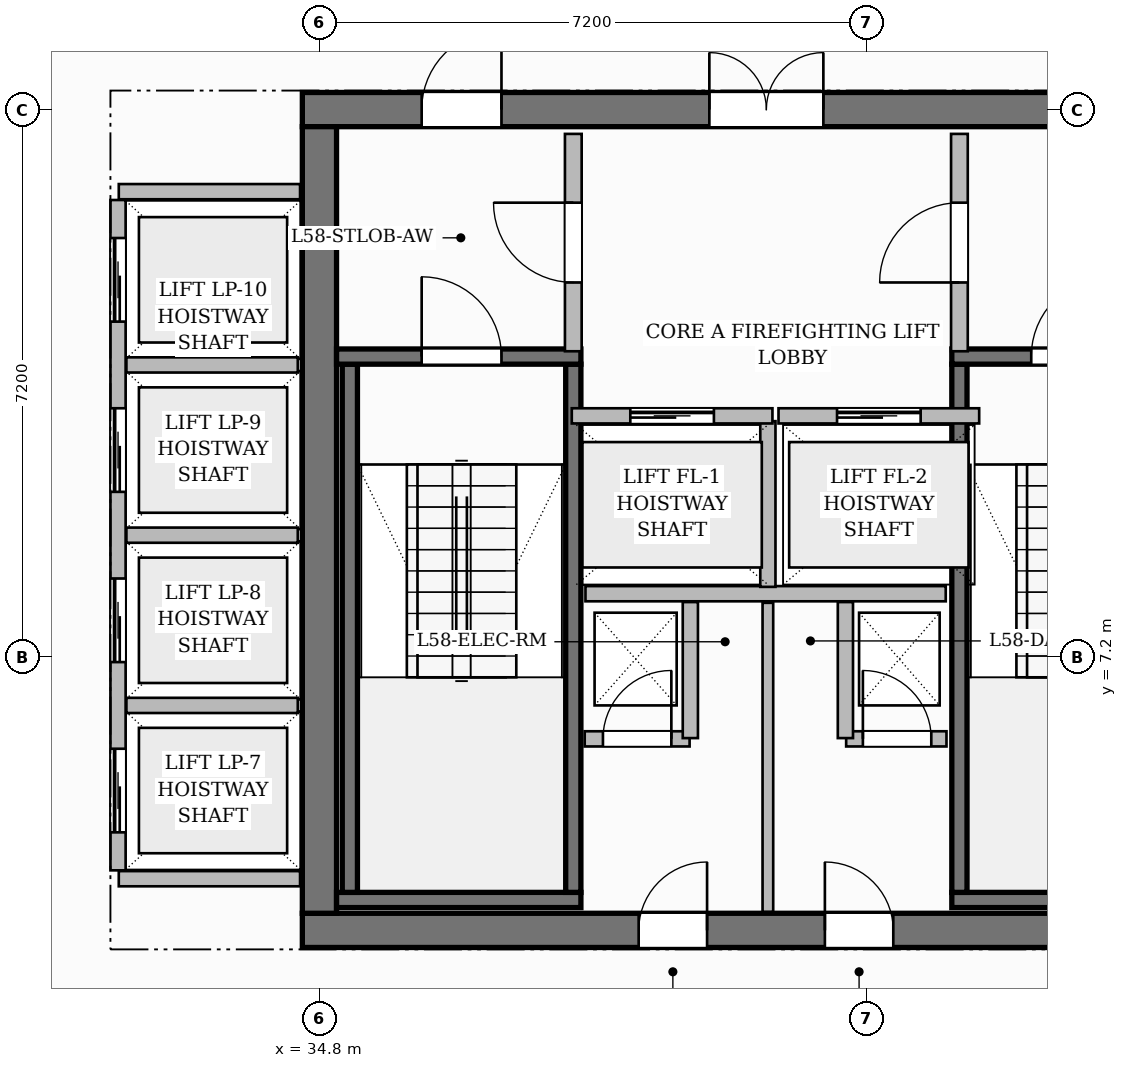
"""IFC4 building model, lengths in metres.
Left out: names, types, materials, properties, quantities, classifications, styles, units other than length and angle.
Written with IfcOpenShell. Run it as: python <this file> out.ifc"""

import sys

from ifc_helpers import new_model, si_unit, direction, frame, frame_2d, origin, place, context, subcontext, project, spatial, rectangle, extrude, source, transform, mapped, element, fill, save


model = new_model("IFC4")
c1 = context("Model", 3, precision=1e-05, world=origin(), true_north=direction((0.0, 1.0)))
c2 = subcontext(c1, "Body", "Model", "MODEL_VIEW")
j1 = project(units=[si_unit("LENGTHUNIT", "METRE"), si_unit("PLANEANGLEUNIT", "RADIAN")], contexts=[c1])
p1 = place(None, origin())
s1 = spatial("IfcSite", under=j1, at=p1, CompositionType="ELEMENT")
p2 = place(p1, origin())
s2 = spatial("IfcBuilding", under=s1, at=p2, CompositionType="ELEMENT")
p3 = place(p2, frame((0.0, 0.0, 232.7)))
s3 = spatial("IfcBuildingStorey", under=s2, at=p3, CompositionType="ELEMENT", Elevation=232.7)
p4 = place(p3, frame((34.575, 3.6, 0.0), z_axis=(0.0, 0.0, 1.0), x_axis=(1.0, 0.0, 0.0)))
e1 = element("IfcWall", 1, at=p4, inside=s3, PredefinedType="SHEAR", context=c2, shape_type="SweptSolid", body=[
    extrude(rectangle(XDim=15.45, YDim=0.45, at=frame_2d((7.725, 0.0))), origin(), (0.0, 0.0, 1.0), 3.85),
])
p5 = place(p4, frame((4.425, 0.0, 0.0)))
e2 = element("IfcOpeningElement", 2, at=p5, cuts=e1, PredefinedType="OPENING", context=c2, shape_type="SweptSolid", body=[
    extrude(rectangle(XDim=0.9, YDim=2.1, at=frame_2d((0.45, 1.05))), frame((0.0, 0.235, 0.0), z_axis=(0.0, -1.0, 0.0), x_axis=(1.0, 0.0, 0.0)), (0.0, 0.0, 1.0), 0.47),
])
p6 = place(p4, frame((6.875, 0.0, 0.0)))
e3 = element("IfcOpeningElement", 3, at=p6, cuts=e1, PredefinedType="OPENING", context=c2, shape_type="SweptSolid", body=[
    extrude(rectangle(XDim=0.9, YDim=2.1, at=frame_2d((0.45, 1.05))), frame((0.0, 0.235, 0.0), z_axis=(0.0, -1.0, 0.0), x_axis=(1.0, 0.0, 0.0)), (0.0, 0.0, 1.0), 0.47),
])
p7 = place(p3, frame((34.575, 14.4, 0.0), z_axis=(0.0, 0.0, 1.0), x_axis=(1.0, 0.0, 0.0)))
e4 = element("IfcWall", 4, at=p7, inside=s3, PredefinedType="SHEAR", context=c2, shape_type="SweptSolid", body=[
    extrude(rectangle(XDim=15.45, YDim=0.45, at=frame_2d((7.725, 0.0))), origin(), (0.0, 0.0, 1.0), 3.85),
])
p8 = place(p7, frame((5.355, 0.0, 0.0)))
e5 = element("IfcOpeningElement", 5, at=p8, cuts=e4, PredefinedType="OPENING", context=c2, shape_type="SweptSolid", body=[
    extrude(rectangle(XDim=1.5, YDim=2.2, at=frame_2d((0.75, 1.1))), frame((0.0, 0.235, 0.0), z_axis=(0.0, -1.0, 0.0), x_axis=(1.0, 0.0, 0.0)), (0.0, 0.0, 1.0), 0.47),
])
p9 = place(p7, frame((1.57, 0.0, 0.0)))
e6 = element("IfcOpeningElement", 6, at=p9, cuts=e4, PredefinedType="OPENING", context=c2, shape_type="SweptSolid", body=[
    extrude(rectangle(XDim=1.05, YDim=2.15, at=frame_2d((0.525, 1.075))), frame((0.0, 0.235, 0.0), z_axis=(0.0, -1.0, 0.0), x_axis=(1.0, 0.0, 0.0)), (0.0, 0.0, 1.0), 0.47),
])
p10 = place(p7, frame((11.2, 0.0, 0.0)))
e7 = element("IfcOpeningElement", 7, at=p10, cuts=e4, PredefinedType="OPENING", context=c2, shape_type="SweptSolid", body=[
    extrude(rectangle(XDim=1.05, YDim=2.15, at=frame_2d((0.525, 1.075))), frame((0.0, 0.235, 0.0), z_axis=(0.0, -1.0, 0.0), x_axis=(1.0, 0.0, 0.0)), (0.0, 0.0, 1.0), 0.47),
])
p11 = place(p3, frame((34.8, 3.825, 0.0), z_axis=(0.0, 0.0, 1.0), x_axis=(0.0, 1.0, 0.0)))
e8 = element("IfcWall", 8, at=p11, inside=s3, PredefinedType="SHEAR", context=c2, shape_type="SweptSolid", body=[
    extrude(rectangle(XDim=10.35, YDim=0.45, at=frame_2d((5.175, 0.0))), origin(), (0.0, 0.0, 1.0), 3.85),
])
p12 = place(p3, frame((35.025, 4.0, 0.0), z_axis=(0.0, 0.0, 1.0), x_axis=(1.0, 0.0, 0.0)))
e9 = element("IfcWall", 9, at=p12, inside=s3, PredefinedType="SHEAR", context=c2, shape_type="SweptSolid", body=[
    extrude(rectangle(XDim=3.215, YDim=0.2, at=frame_2d((1.607, 0.0))), origin(), (0.0, 0.0, 1.0), 3.85),
])
for number, where, z_axis, x_axis in (
    (10, (35.2, 4.1, 0.0), (0.0, 0.0, 1.0), (0.0, 1.0, 0.0)),
    (11, (38.14, 4.1, 0.0), (0.0, 0.0, 1.0), (0.0, 1.0, 0.0)),
):
    element("IfcWall", number, at=place(p3, frame(where, z_axis=z_axis, x_axis=x_axis)), inside=s3, PredefinedType="SHEAR", context=c2, shape_type="SweptSolid", body=[
        extrude(rectangle(XDim=6.95, YDim=0.2, at=frame_2d((3.475, 0.0))), origin(), (0.0, 0.0, 1.0), 3.85),
    ])
p13 = place(p3, frame((35.025, 11.15, 0.0), z_axis=(0.0, 0.0, 1.0), x_axis=(1.0, 0.0, 0.0)))
e12 = element("IfcWall", 12, at=p13, inside=s3, PredefinedType="SHEAR", context=c2, shape_type="SweptSolid", body=[
    extrude(rectangle(XDim=3.215, YDim=0.2, at=frame_2d((1.607, 0.0))), origin(), (0.0, 0.0, 1.0), 3.85),
])
p14 = place(p13, frame((1.12, 0.0, 0.0)))
e13 = element("IfcOpeningElement", 13, at=p14, cuts=e12, PredefinedType="OPENING", context=c2, shape_type="SweptSolid", body=[
    extrude(rectangle(XDim=1.05, YDim=2.2, at=frame_2d((0.525, 1.1))), frame((0.0, 0.11, 0.0), z_axis=(0.0, -1.0, 0.0), x_axis=(1.0, 0.0, 0.0)), (0.0, 0.0, 1.0), 0.22),
])
p15 = place(p3, frame((43.12, 4.0, 0.0), z_axis=(0.0, 0.0, 1.0), x_axis=(1.0, 0.0, 0.0)))
e14 = element("IfcWall", 14, at=p15, inside=s3, PredefinedType="SHEAR", context=c2, shape_type="SweptSolid", body=[
    extrude(rectangle(XDim=6.455, YDim=0.2, at=frame_2d((3.228, 0.0))), origin(), (0.0, 0.0, 1.0), 3.85),
])
p16 = place(p3, frame((43.22, 4.1, 0.0), z_axis=(0.0, 0.0, 1.0), x_axis=(0.0, 1.0, 0.0)))
e15 = element("IfcWall", 15, at=p16, inside=s3, PredefinedType="SHEAR", context=c2, shape_type="SweptSolid", body=[
    extrude(rectangle(XDim=6.95, YDim=0.2, at=frame_2d((3.475, 0.0))), origin(), (0.0, 0.0, 1.0), 3.85),
])
p17 = place(p3, frame((43.12, 11.15, 0.0), z_axis=(0.0, 0.0, 1.0), x_axis=(1.0, 0.0, 0.0)))
e16 = element("IfcWall", 16, at=p17, inside=s3, PredefinedType="SHEAR", context=c2, shape_type="SweptSolid", body=[
    extrude(rectangle(XDim=6.455, YDim=0.2, at=frame_2d((3.228, 0.0))), origin(), (0.0, 0.0, 1.0), 3.85),
])
p18 = place(p17, frame((1.045, 0.0, 0.0)))
e17 = element("IfcOpeningElement", 17, at=p18, cuts=e16, PredefinedType="OPENING", context=c2, shape_type="SweptSolid", body=[
    extrude(rectangle(XDim=1.05, YDim=2.2, at=frame_2d((0.525, 1.1))), frame((0.0, 0.11, 0.0), z_axis=(0.0, -1.0, 0.0), x_axis=(1.0, 0.0, 0.0)), (0.0, 0.0, 1.0), 0.22),
])
p19 = place(p17, frame((4.125, 0.0, 0.0)))
e18 = element("IfcOpeningElement", 18, at=p19, cuts=e16, PredefinedType="OPENING", context=c2, shape_type="SweptSolid", body=[
    extrude(rectangle(XDim=1.05, YDim=2.2, at=frame_2d((0.525, 1.1))), frame((0.0, 0.11, 0.0), z_axis=(0.0, -1.0, 0.0), x_axis=(1.0, 0.0, 0.0)), (0.0, 0.0, 1.0), 0.22),
])
p20 = place(p3, frame((38.3, 8.03, 0.0), z_axis=(0.0, 0.0, 1.0), x_axis=(1.0, 0.0, 0.0)))
e19 = element("IfcWall", 19, at=p20, inside=s3, PredefinedType="PARTITIONING", context=c2, shape_type="SweptSolid", body=[
    extrude(rectangle(XDim=4.74, YDim=0.2, at=frame_2d((2.37, 0.0))), origin(), (0.0, 0.0, 1.0), 3.6),
])
p21 = place(p3, frame((40.7, 8.12, 0.0), z_axis=(0.0, 0.0, 1.0), x_axis=(0.0, 1.0, 0.0)))
e20 = element("IfcWall", 20, at=p21, inside=s3, PredefinedType="PARTITIONING", context=c2, shape_type="SweptSolid", body=[
    extrude(rectangle(XDim=2.18, YDim=0.2, at=frame_2d((1.09, 0.0))), origin(), (0.0, 0.0, 1.0), 3.6),
])
p22 = place(p3, frame((38.14, 11.22, 0.0), z_axis=(0.0, 0.0, 1.0), x_axis=(0.0, 1.0, 0.0)))
e21 = element("IfcWall", 21, at=p22, inside=s3, PredefinedType="PARTITIONING", context=c2, shape_type="SweptSolid", body=[
    extrude(rectangle(XDim=2.86, YDim=0.22, at=frame_2d((1.43, 0.0))), origin(), (0.0, 0.0, 1.0), 3.6),
])
p23 = place(p22, frame((0.905, 0.0, 0.0)))
e22 = element("IfcOpeningElement", 22, at=p23, cuts=e21, PredefinedType="OPENING", context=c2, shape_type="SweptSolid", body=[
    extrude(rectangle(XDim=1.05, YDim=2.15, at=frame_2d((0.525, 1.075))), frame((0.0, 0.12, 0.0), z_axis=(0.0, -1.0, 0.0), x_axis=(1.0, 0.0, 0.0)), (0.0, 0.0, 1.0), 0.24),
])
p24 = place(p3, frame((43.22, 11.22, 0.0), z_axis=(0.0, 0.0, 1.0), x_axis=(0.0, 1.0, 0.0)))
e23 = element("IfcWall", 23, at=p24, inside=s3, PredefinedType="PARTITIONING", context=c2, shape_type="SweptSolid", body=[
    extrude(rectangle(XDim=2.86, YDim=0.22, at=frame_2d((1.43, 0.0))), origin(), (0.0, 0.0, 1.0), 3.6),
])
p25 = place(p24, frame((0.905, 0.0, 0.0)))
e24 = element("IfcOpeningElement", 24, at=p25, cuts=e23, PredefinedType="OPENING", context=c2, shape_type="SweptSolid", body=[
    extrude(rectangle(XDim=1.05, YDim=2.15, at=frame_2d((0.525, 1.075))), frame((0.0, 0.12, 0.0), z_axis=(0.0, -1.0, 0.0), x_axis=(1.0, 0.0, 0.0)), (0.0, 0.0, 1.0), 0.24),
])
p26 = place(p3, frame((38.29, 6.12, 0.0), z_axis=(0.0, 0.0, 1.0), x_axis=(1.0, 0.0, 0.0)))
e25 = element("IfcWall", 25, at=p26, inside=s3, PredefinedType="PARTITIONING", context=c2, shape_type="SweptSolid", body=[
    extrude(rectangle(XDim=1.38, YDim=0.2, at=frame_2d((0.69, 0.0))), origin(), (0.0, 0.0, 1.0), 3.6),
])
p27 = place(p26, frame((0.24, 0.0, 0.0)))
e26 = element("IfcOpeningElement", 26, at=p27, cuts=e25, PredefinedType="OPENING", context=c2, shape_type="SweptSolid", body=[
    extrude(rectangle(XDim=0.9, YDim=2.1, at=frame_2d((0.45, 1.05))), frame((0.0, 0.11, 0.0), z_axis=(0.0, -1.0, 0.0), x_axis=(1.0, 0.0, 0.0)), (0.0, 0.0, 1.0), 0.22),
])
p28 = place(p3, frame((39.68, 6.13, 0.0), z_axis=(0.0, 0.0, 1.0), x_axis=(0.0, 1.0, 0.0)))
e27 = element("IfcWall", 27, at=p28, inside=s3, PredefinedType="PARTITIONING", context=c2, shape_type="SweptSolid", body=[
    extrude(rectangle(XDim=1.79, YDim=0.2, at=frame_2d((0.895, 0.0))), origin(), (0.0, 0.0, 1.0), 3.6),
])
p29 = place(p3, frame((41.73, 6.12, 0.0), z_axis=(0.0, 0.0, 1.0), x_axis=(1.0, 0.0, 0.0)))
e28 = element("IfcWall", 28, at=p29, inside=s3, PredefinedType="PARTITIONING", context=c2, shape_type="SweptSolid", body=[
    extrude(rectangle(XDim=1.32, YDim=0.2, at=frame_2d((0.66, 0.0))), origin(), (0.0, 0.0, 1.0), 3.6),
])
p30 = place(p29, frame((0.22, 0.0, 0.0)))
e29 = element("IfcOpeningElement", 29, at=p30, cuts=e28, PredefinedType="OPENING", context=c2, shape_type="SweptSolid", body=[
    extrude(rectangle(XDim=0.9, YDim=2.1, at=frame_2d((0.45, 1.05))), frame((0.0, 0.11, 0.0), z_axis=(0.0, -1.0, 0.0), x_axis=(1.0, 0.0, 0.0)), (0.0, 0.0, 1.0), 0.22),
])
p31 = place(p3, frame((41.72, 6.13, 0.0), z_axis=(0.0, 0.0, 1.0), x_axis=(0.0, 1.0, 0.0)))
e30 = element("IfcWall", 30, at=p31, inside=s3, PredefinedType="PARTITIONING", context=c2, shape_type="SweptSolid", body=[
    extrude(rectangle(XDim=1.79, YDim=0.2, at=frame_2d((0.895, 0.0))), origin(), (0.0, 0.0, 1.0), 3.6),
])
p32 = place(p3, frame((40.7, 3.845, 0.0), z_axis=(0.0, 0.0, 1.0), x_axis=(0.0, 1.0, 0.0)))
e31 = element("IfcWall", 31, at=p32, inside=s3, PredefinedType="PARTITIONING", context=c2, shape_type="SweptSolid", body=[
    extrude(rectangle(XDim=4.065, YDim=0.14, at=frame_2d((2.032, 0.0))), origin(), (0.0, 0.0, 1.0), 3.6),
])
for number, where, z_axis, x_axis in (
    (32, (32.16, 4.28, 0.0), (0.0, 0.0, 1.0), (1.0, 0.0, 0.0)),
    (33, (32.16, 13.32, 0.0), (0.0, 0.0, 1.0), (1.0, 0.0, 0.0)),
):
    element("IfcWall", number, at=place(p3, frame(where, z_axis=z_axis, x_axis=x_axis)), inside=s3, PredefinedType="PARTITIONING", context=c2, shape_type="SweptSolid", body=[
        extrude(rectangle(XDim=2.385, YDim=0.2, at=frame_2d((1.192, 0.0))), origin(), (0.0, 0.0, 1.0), 3.6),
    ])
p33 = place(p3, frame((32.15, 4.39, 0.0), z_axis=(0.0, 0.0, 1.0), x_axis=(0.0, 1.0, 0.0)))
e34 = element("IfcWall", 34, at=p33, inside=s3, PredefinedType="PARTITIONING", context=c2, shape_type="SweptSolid", body=[
    extrude(rectangle(XDim=8.82, YDim=0.2, at=frame_2d((4.41, 0.0))), origin(), (0.0, 0.0, 1.0), 3.6),
])
p34 = place(p33, frame((0.5, 0.0, 0.0)))
e35 = element("IfcOpeningElement", 35, at=p34, cuts=e34, PredefinedType="OPENING", context=c2, shape_type="SweptSolid", body=[
    extrude(rectangle(XDim=1.1, YDim=2.2, at=frame_2d((0.55, 1.1))), frame((0.0, 0.11, 0.0), z_axis=(0.0, -1.0, 0.0), x_axis=(1.0, 0.0, 0.0)), (0.0, 0.0, 1.0), 0.22),
])
p35 = place(p33, frame((2.74, 0.0, 0.0)))
e36 = element("IfcOpeningElement", 36, at=p35, cuts=e34, PredefinedType="OPENING", context=c2, shape_type="SweptSolid", body=[
    extrude(rectangle(XDim=1.1, YDim=2.2, at=frame_2d((0.55, 1.1))), frame((0.0, 0.11, 0.0), z_axis=(0.0, -1.0, 0.0), x_axis=(1.0, 0.0, 0.0)), (0.0, 0.0, 1.0), 0.22),
])
p36 = place(p33, frame((4.98, 0.0, 0.0)))
e37 = element("IfcOpeningElement", 37, at=p36, cuts=e34, PredefinedType="OPENING", context=c2, shape_type="SweptSolid", body=[
    extrude(rectangle(XDim=1.1, YDim=2.2, at=frame_2d((0.55, 1.1))), frame((0.0, 0.11, 0.0), z_axis=(0.0, -1.0, 0.0), x_axis=(1.0, 0.0, 0.0)), (0.0, 0.0, 1.0), 0.22),
])
p37 = place(p33, frame((7.22, 0.0, 0.0)))
e38 = element("IfcOpeningElement", 38, at=p37, cuts=e34, PredefinedType="OPENING", context=c2, shape_type="SweptSolid", body=[
    extrude(rectangle(XDim=1.1, YDim=2.2, at=frame_2d((0.55, 1.1))), frame((0.0, 0.11, 0.0), z_axis=(0.0, -1.0, 0.0), x_axis=(1.0, 0.0, 0.0)), (0.0, 0.0, 1.0), 0.22),
])
for number, where, z_axis, x_axis in (
    (39, (32.26, 6.56, 0.0), (0.0, 0.0, 1.0), (1.0, 0.0, 0.0)),
    (40, (32.26, 8.8, 0.0), (0.0, 0.0, 1.0), (1.0, 0.0, 0.0)),
    (41, (32.26, 11.04, 0.0), (0.0, 0.0, 1.0), (1.0, 0.0, 0.0)),
):
    element("IfcWall", number, at=place(p3, frame(where, z_axis=z_axis, x_axis=x_axis)), inside=s3, PredefinedType="PARTITIONING", context=c2, shape_type="SweptSolid", body=[
        extrude(rectangle(XDim=2.255, YDim=0.2, at=frame_2d((1.127, 0.0))), origin(), (0.0, 0.0, 1.0), 3.6),
    ])
p38 = place(p3, frame((38.12, 10.37, 0.0), z_axis=(0.0, 0.0, 1.0), x_axis=(1.0, 0.0, 0.0)))
e42 = element("IfcWall", 42, at=p38, inside=s3, PredefinedType="PARTITIONING", context=c2, shape_type="SweptSolid", body=[
    extrude(rectangle(XDim=2.64, YDim=0.2, at=frame_2d((1.32, 0.0))), origin(), (0.0, 0.0, 1.0), 3.6),
])
p39 = place(p38, frame((0.77, 0.0, 0.0)))
e43 = element("IfcOpeningElement", 43, at=p39, cuts=e42, PredefinedType="OPENING", context=c2, shape_type="SweptSolid", body=[
    extrude(rectangle(XDim=1.1, YDim=2.2, at=frame_2d((0.55, 1.1))), frame((0.0, 0.11, 0.0), z_axis=(0.0, -1.0, 0.0), x_axis=(1.0, 0.0, 0.0)), (0.0, 0.0, 1.0), 0.22),
])
p40 = place(p3, frame((40.84, 10.37, 0.0), z_axis=(0.0, 0.0, 1.0), x_axis=(1.0, 0.0, 0.0)))
e44 = element("IfcWall", 44, at=p40, inside=s3, PredefinedType="PARTITIONING", context=c2, shape_type="SweptSolid", body=[
    extrude(rectangle(XDim=2.64, YDim=0.2, at=frame_2d((1.32, 0.0))), origin(), (0.0, 0.0, 1.0), 3.6),
])
p41 = place(p40, frame((0.77, 0.0, 0.0)))
e45 = element("IfcOpeningElement", 45, at=p41, cuts=e44, PredefinedType="OPENING", context=c2, shape_type="SweptSolid", body=[
    extrude(rectangle(XDim=1.1, YDim=2.2, at=frame_2d((0.55, 1.1))), frame((0.0, 0.11, 0.0), z_axis=(0.0, -1.0, 0.0), x_axis=(1.0, 0.0, 0.0)), (0.0, 0.0, 1.0), 0.22),
])
m1 = source(origin(), c2, "Body", "SweptSolid", [
    extrude(rectangle(XDim=1.05, YDim=2.2, at=frame_2d((0.525, 1.1))), frame((0.0, 0.025, 0.0), z_axis=(0.0, -1.0, 0.0), x_axis=(1.0, 0.0, 0.0)), (0.0, 0.0, 1.0), 0.05),
])
p42 = place(p14, origin())
e46 = element("IfcDoor", 46, at=p42, inside=s3, OperationType="SINGLE_SWING_LEFT", PredefinedType="DOOR", context=c2, shape_type="MappedRepresentation", body=[
    mapped(m1, transform((0.0, 0.0, 0.0), scale=1.0)),
])
fill(e13, e46)
p43 = place(p18, origin())
e47 = element("IfcDoor", 47, at=p43, inside=s3, OperationType="SINGLE_SWING_RIGHT", PredefinedType="DOOR", context=c2, shape_type="MappedRepresentation", body=[
    mapped(m1, transform((0.0, 0.0, 0.0), scale=1.0)),
])
fill(e17, e47)
m2 = source(origin(), c2, "Body", "SweptSolid", [
    extrude(rectangle(XDim=1.05, YDim=2.15, at=frame_2d((0.525, 1.075))), frame((0.0, 0.025, 0.0), z_axis=(0.0, -1.0, 0.0), x_axis=(1.0, 0.0, 0.0)), (0.0, 0.0, 1.0), 0.05),
])
p44 = place(p23, origin())
e48 = element("IfcDoor", 48, at=p44, inside=s3, OperationType="SINGLE_SWING_RIGHT", PredefinedType="DOOR", context=c2, shape_type="MappedRepresentation", body=[
    mapped(m2, transform((0.0, 0.0, 0.0), scale=1.0)),
])
fill(e22, e48)
p45 = place(p25, origin())
e49 = element("IfcDoor", 49, at=p45, inside=s3, OperationType="SINGLE_SWING_LEFT", PredefinedType="DOOR", context=c2, shape_type="MappedRepresentation", body=[
    mapped(m2, transform((0.0, 0.0, 0.0), scale=1.0)),
])
fill(e24, e49)
m3 = source(origin(), c2, "Body", "SweptSolid", [
    extrude(rectangle(XDim=1.5, YDim=2.2, at=frame_2d((0.75, 1.1))), frame((0.0, 0.025, 0.0), z_axis=(0.0, -1.0, 0.0), x_axis=(1.0, 0.0, 0.0)), (0.0, 0.0, 1.0), 0.05),
])
p46 = place(p8, origin())
e50 = element("IfcDoor", 50, at=p46, inside=s3, OperationType="DOUBLE_DOOR_SINGLE_SWING", PredefinedType="DOOR", context=c2, shape_type="MappedRepresentation", body=[
    mapped(m3, transform((0.0, 0.0, 0.0), scale=1.0)),
])
fill(e5, e50)
p47 = place(p9, origin())
e51 = element("IfcDoor", 51, at=p47, inside=s3, OperationType="SINGLE_SWING_RIGHT", PredefinedType="DOOR", context=c2, shape_type="MappedRepresentation", body=[
    mapped(m2, transform((0.0, 0.0, 0.0), scale=1.0)),
])
fill(e6, e51)
m4 = source(origin(), c2, "Body", "SweptSolid", [
    extrude(rectangle(XDim=0.9, YDim=2.1, at=frame_2d((0.45, 1.05))), frame((0.0, 0.025, 0.0), z_axis=(0.0, -1.0, 0.0), x_axis=(1.0, 0.0, 0.0)), (0.0, 0.0, 1.0), 0.05),
])
p48 = place(p27, origin())
e52 = element("IfcDoor", 52, at=p48, inside=s3, OperationType="SINGLE_SWING_RIGHT", PredefinedType="DOOR", context=c2, shape_type="MappedRepresentation", body=[
    mapped(m4, transform((0.0, 0.0, 0.0), scale=1.0)),
])
fill(e26, e52)
p49 = place(p30, origin())
e53 = element("IfcDoor", 53, at=p49, inside=s3, OperationType="SINGLE_SWING_LEFT", PredefinedType="DOOR", context=c2, shape_type="MappedRepresentation", body=[
    mapped(m4, transform((0.0, 0.0, 0.0), scale=1.0)),
])
fill(e29, e53)
p50 = place(p5, origin())
e54 = element("IfcDoor", 54, at=p50, inside=s3, OperationType="SINGLE_SWING_RIGHT", PredefinedType="DOOR", context=c2, shape_type="MappedRepresentation", body=[
    mapped(m4, transform((0.0, 0.0, 0.0), scale=1.0)),
])
fill(e2, e54)
p51 = place(p6, origin())
e55 = element("IfcDoor", 55, at=p51, inside=s3, OperationType="SINGLE_SWING_LEFT", PredefinedType="DOOR", context=c2, shape_type="MappedRepresentation", body=[
    mapped(m4, transform((0.0, 0.0, 0.0), scale=1.0)),
])
fill(e3, e55)
m5 = source(origin(), c2, "Body", "SweptSolid", [
    extrude(rectangle(XDim=1.1, YDim=2.2, at=frame_2d((0.55, 1.1))), frame((0.0, 0.025, 0.0), z_axis=(0.0, -1.0, 0.0), x_axis=(1.0, 0.0, 0.0)), (0.0, 0.0, 1.0), 0.05),
])
p52 = place(p39, origin())
e56 = element("IfcDoor", 56, at=p52, inside=s3, OperationType="SLIDING_TO_LEFT", PredefinedType="DOOR", context=c2, shape_type="MappedRepresentation", body=[
    mapped(m5, transform((0.0, 0.0, 0.0), scale=1.0)),
])
fill(e43, e56)
p53 = place(p41, origin())
e57 = element("IfcDoor", 57, at=p53, inside=s3, OperationType="SLIDING_TO_LEFT", PredefinedType="DOOR", context=c2, shape_type="MappedRepresentation", body=[
    mapped(m5, transform((0.0, 0.0, 0.0), scale=1.0)),
])
fill(e45, e57)
p54 = place(p34, origin())
e58 = element("IfcDoor", 58, at=p54, inside=s3, OperationType="SLIDING_TO_LEFT", PredefinedType="DOOR", context=c2, shape_type="MappedRepresentation", body=[
    mapped(m5, transform((0.0, 0.0, 0.0), scale=1.0)),
])
fill(e35, e58)
p55 = place(p35, origin())
e59 = element("IfcDoor", 59, at=p55, inside=s3, OperationType="SLIDING_TO_LEFT", PredefinedType="DOOR", context=c2, shape_type="MappedRepresentation", body=[
    mapped(m5, transform((0.0, 0.0, 0.0), scale=1.0)),
])
fill(e36, e59)
p56 = place(p36, origin())
e60 = element("IfcDoor", 60, at=p56, inside=s3, OperationType="SLIDING_TO_LEFT", PredefinedType="DOOR", context=c2, shape_type="MappedRepresentation", body=[
    mapped(m5, transform((0.0, 0.0, 0.0), scale=1.0)),
])
fill(e37, e60)
p57 = place(p37, origin())
e61 = element("IfcDoor", 61, at=p57, inside=s3, OperationType="SLIDING_TO_LEFT", PredefinedType="DOOR", context=c2, shape_type="MappedRepresentation", body=[
    mapped(m5, transform((0.0, 0.0, 0.0), scale=1.0)),
])
fill(e38, e61)
save(model, sys.argv[1])
